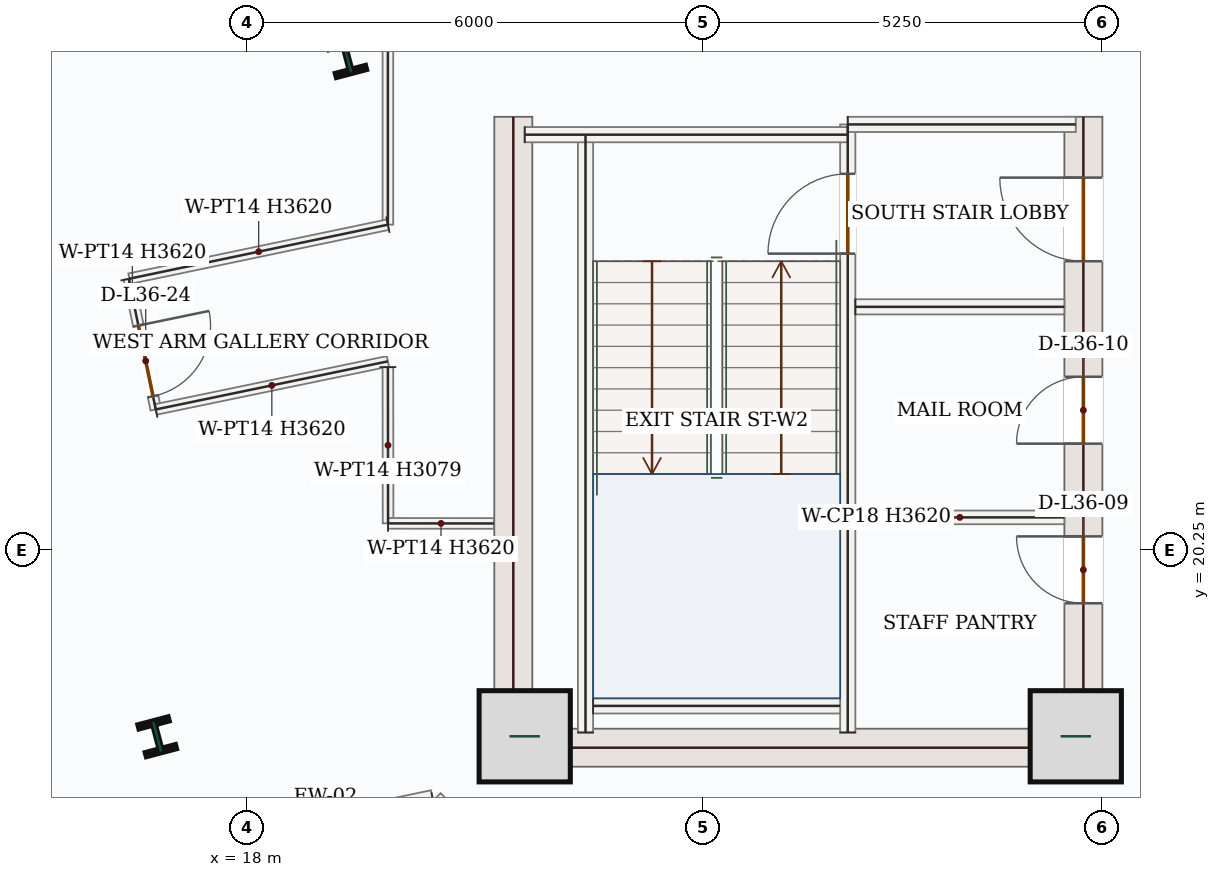
"""IFC4 building model, lengths in metres.
Left out: names, types, materials, properties, quantities, classifications, styles, units other than length and angle.
Written with IfcOpenShell. Run it as: python <this file> out.ifc"""

import sys

from ifc_helpers import new_model, si_unit, direction, frame, frame_2d, origin, origin_2d, place, context, subcontext, project, spatial, rectangle, i_section, extrude, source, transform, mapped, element, fill, save


model = new_model("IFC4")
c1 = context("Model", 3, precision=1e-05, world=origin(), true_north=direction((0.0, 1.0)))
c2 = subcontext(c1, "Body", "Model", "MODEL_VIEW")
j1 = project(units=[si_unit("LENGTHUNIT", "METRE"), si_unit("PLANEANGLEUNIT", "RADIAN")], contexts=[c1])
p1 = place(None, origin())
s1 = spatial("IfcSite", under=j1, at=p1, CompositionType="ELEMENT")
p2 = place(p1, origin())
s2 = spatial("IfcBuilding", under=s1, at=p2, CompositionType="ELEMENT")
p3 = place(p2, frame((0.0, 0.0, 159.0)))
s3 = spatial("IfcBuildingStorey", under=s2, at=p3, CompositionType="ELEMENT", Elevation=159.0)
m1 = source(origin(), c2, "Body", "SweptSolid", [
    extrude(rectangle(XDim=8.55, YDim=0.5, at=frame_2d((4.275, 0.0))), origin(), (0.0, 0.0, 1.0), 3.62),
])
p4 = place(p3, frame((21.5, 17.4, 0.0), z_axis=(0.0, 0.0, 1.0), x_axis=(0.0, 1.0, 0.0)))
e1 = element("IfcWall", 1, at=p4, inside=s3, PredefinedType="SHEAR", context=c2, shape_type="MappedRepresentation", body=[
    mapped(m1, transform((0.0, 0.0, 0.0), x_axis=(1.0, 0.0, 0.0), y_axis=(0.0, 1.0, 0.0), z_axis=(0.0, 0.0, 1.0), scale=1.0)),
])
p5 = place(p3, frame((29.0, 17.4, 0.0), z_axis=(0.0, 0.0, 1.0), x_axis=(0.0, 1.0, 0.0)))
e2 = element("IfcWall", 2, at=p5, inside=s3, PredefinedType="SHEAR", context=c2, shape_type="SweptSolid", body=[
    extrude(rectangle(XDim=8.55, YDim=0.5, at=frame_2d((4.275, 0.0))), origin(), (0.0, 0.0, 1.0), 3.62),
])
p6 = place(p5, frame((6.65, 0.0, 0.0)))
e3 = element("IfcOpeningElement", 3, at=p6, cuts=e2, PredefinedType="OPENING", context=c2, shape_type="SweptSolid", body=[
    extrude(rectangle(XDim=1.1, YDim=2.2, at=frame_2d((0.55, 1.1))), frame((0.0, 0.26, 0.0), z_axis=(0.0, -1.0, 0.0), x_axis=(1.0, 0.0, 0.0)), (0.0, 0.0, 1.0), 0.52),
])
p7 = place(p5, frame((2.15, 0.0, 0.0)))
e4 = element("IfcOpeningElement", 4, at=p7, cuts=e2, PredefinedType="OPENING", context=c2, shape_type="SweptSolid", body=[
    extrude(rectangle(XDim=0.88, YDim=2.1, at=frame_2d((0.44, 1.05))), frame((0.0, 0.26, 0.0), z_axis=(0.0, -1.0, 0.0), x_axis=(1.0, 0.0, 0.0)), (0.0, 0.0, 1.0), 0.52),
])
p8 = place(p5, frame((4.25, 0.0, 0.0)))
e5 = element("IfcOpeningElement", 5, at=p8, cuts=e2, PredefinedType="OPENING", context=c2, shape_type="SweptSolid", body=[
    extrude(rectangle(XDim=0.88, YDim=2.1, at=frame_2d((0.44, 1.05))), frame((0.0, 0.26, 0.0), z_axis=(0.0, -1.0, 0.0), x_axis=(1.0, 0.0, 0.0)), (0.0, 0.0, 1.0), 0.52),
])
m2 = source(origin(), c2, "Body", "SweptSolid", [
    extrude(rectangle(XDim=7.0, YDim=0.5, at=frame_2d((3.5, 0.0))), origin(), (0.0, 0.0, 1.0), 3.62),
])
p9 = place(p3, frame((21.75, 17.65, 0.0), z_axis=(0.0, 0.0, 1.0), x_axis=(1.0, 0.0, 0.0)))
e6 = element("IfcWall", 6, at=p9, inside=s3, PredefinedType="SHEAR", context=c2, shape_type="MappedRepresentation", body=[
    mapped(m2, transform((0.0, 0.0, 0.0), x_axis=(1.0, 0.0, 0.0), y_axis=(0.0, 1.0, 0.0), z_axis=(0.0, 0.0, 1.0), scale=1.0)),
])
m3 = source(origin(), c2, "Body", "SweptSolid", [
    extrude(rectangle(XDim=1.2, YDim=1.2, at=origin_2d()), origin(), (0.0, 0.0, 1.0), 3.9),
])
for number, where, z_axis, x_axis in (
    (7, (21.65, 17.8, 0.0), (0.0, 0.0, 1.0), (1.0, 0.0, 0.0)),
    (8, (28.9, 17.8, 0.0), (0.0, 0.0, 1.0), (1.0, 0.0, 0.0)),
):
    element("IfcColumn", number, at=place(p3, frame(where, z_axis=z_axis, x_axis=x_axis)), inside=s3, PredefinedType="COLUMN", context=c2, shape_type="MappedRepresentation", body=[
        mapped(m3, transform((0.0, 0.0, 0.0), x_axis=(1.0, 0.0, 0.0), y_axis=(0.0, 1.0, 0.0), z_axis=(0.0, 0.0, 1.0), scale=1.0)),
    ])
m4 = source(origin(), c2, "Body", "SweptSolid", [
    extrude(i_section(OverallWidth=0.412, OverallDepth=0.435, WebThickness=0.036, FlangeThickness=0.057, FilletRadius=0.018, at=origin_2d()), origin(), (0.0, 0.0, 1.0), 3.9),
])
for number, where, z_axis, x_axis in (
    (9, (19.316, 26.729, 0.0), (0.0, 0.0, 1.0), (0.967, 0.255, 0.0)),
    (10, (16.815, 17.794, 0.0), (0.0, 0.0, 1.0), (0.967, 0.255, 0.0)),
):
    element("IfcColumn", number, at=place(p3, frame(where, z_axis=z_axis, x_axis=x_axis)), inside=s3, PredefinedType="COLUMN", context=c2, shape_type="MappedRepresentation", body=[
        mapped(m4, transform((0.0, 0.0, 0.0), x_axis=(1.0, 0.0, 0.0), y_axis=(0.0, 1.0, 0.0), z_axis=(0.0, 0.0, 1.0), scale=1.0)),
    ])
m5 = source(origin(), c2, "Body", "SweptSolid", [
    extrude(rectangle(XDim=3.129, YDim=0.28, at=frame_2d((1.565, 0.0))), origin(), (0.0, 0.0, 1.0), 3.62),
])
p10 = place(p3, frame((22.658, 14.74, 0.0), z_axis=(0.0, 0.0, 1.0), x_axis=(-0.707067771627, 0.707145788594, 0.0)))
e11 = element("IfcWall", 11, at=p10, inside=s3, PredefinedType="SOLIDWALL", context=c2, shape_type="MappedRepresentation", body=[
    mapped(m5, transform((0.0, 0.0, 0.0), x_axis=(1.0, 0.0, 0.0), y_axis=(0.0, 1.0, 0.0), z_axis=(0.0, 0.0, 1.0), scale=1.0)),
])
p11 = place(p3, frame((20.445, 16.953, 0.0), z_axis=(0.0, 0.0, 1.0), x_axis=(-0.978938136474, -0.204157108515, 0.0)))
e12 = element("IfcWall", 12, at=p11, inside=s3, PredefinedType="SOLIDWALL", context=c2, shape_type="SweptSolid", body=[
    extrude(rectangle(XDim=7.882, YDim=0.28, at=frame_2d((3.941, 0.0))), origin(), (0.0, 0.0, 1.0), 3.62),
])
p12 = place(p11, frame((3.041, 0.0, 0.85)))
e13 = element("IfcOpeningElement", 13, at=p12, cuts=e12, PredefinedType="OPENING", context=c2, shape_type="SweptSolid", body=[
    extrude(rectangle(XDim=1.8, YDim=1.75, at=frame_2d((0.9, 0.875))), frame((0.0, 0.15, 0.0), z_axis=(0.0, -1.0, 0.0), x_axis=(1.0, 0.0, 0.0)), (0.0, 0.0, 1.0), 0.3),
])
m6 = source(origin(), c2, "Body", "SweptSolid", [
    extrude(rectangle(XDim=7.87, YDim=0.2, at=frame_2d((3.935, 0.0))), origin(), (0.0, 0.0, 1.0), 3.62),
])
p13 = place(p3, frame((22.45, 17.85, 0.0), z_axis=(0.0, 0.0, 1.0), x_axis=(0.0, 1.0, 0.0)))
e14 = element("IfcWall", 14, at=p13, inside=s3, PredefinedType="SOLIDWALL", context=c2, shape_type="MappedRepresentation", body=[
    mapped(m6, transform((0.0, 0.0, 0.0), x_axis=(1.0, 0.0, 0.0), y_axis=(0.0, 1.0, 0.0), z_axis=(0.0, 0.0, 1.0), scale=1.0)),
])
p14 = place(p3, frame((25.9, 17.85, 0.0), z_axis=(0.0, 0.0, 1.0), x_axis=(0.0, 1.0, 0.0)))
e15 = element("IfcWall", 15, at=p14, inside=s3, PredefinedType="SOLIDWALL", context=c2, shape_type="SweptSolid", body=[
    extrude(rectangle(XDim=8.0, YDim=0.2, at=frame_2d((4.0, 0.0))), origin(), (0.0, 0.0, 1.0), 3.62),
])
p15 = place(p14, frame((6.3, 0.0, 0.0)))
e16 = element("IfcOpeningElement", 16, at=p15, cuts=e15, PredefinedType="OPENING", context=c2, shape_type="SweptSolid", body=[
    extrude(rectangle(XDim=1.05, YDim=2.15, at=frame_2d((0.525, 1.075))), frame((0.0, 0.11, 0.0), z_axis=(0.0, -1.0, 0.0), x_axis=(1.0, 0.0, 0.0)), (0.0, 0.0, 1.0), 0.22),
])
m7 = source(origin(), c2, "Body", "SweptSolid", [
    extrude(rectangle(XDim=4.25, YDim=0.2, at=frame_2d((2.125, 0.0))), origin(), (0.0, 0.0, 1.0), 3.62),
])
p16 = place(p3, frame((21.65, 25.715, 0.0), z_axis=(0.0, 0.0, 1.0), x_axis=(1.0, 0.0, 0.0)))
e17 = element("IfcWall", 17, at=p16, inside=s3, PredefinedType="SOLIDWALL", context=c2, shape_type="MappedRepresentation", body=[
    mapped(m7, transform((0.0, 0.0, 0.0), x_axis=(1.0, 0.0, 0.0), y_axis=(0.0, 1.0, 0.0), z_axis=(0.0, 0.0, 1.0), scale=1.0)),
])
m8 = source(origin(), c2, "Body", "SweptSolid", [
    extrude(rectangle(XDim=3.0, YDim=0.2, at=frame_2d((1.5, 0.0))), origin(), (0.0, 0.0, 1.0), 3.62),
])
p17 = place(p3, frame((25.9, 25.85, 0.0), z_axis=(0.0, 0.0, 1.0), x_axis=(1.0, 0.0, 0.0)))
e18 = element("IfcWall", 18, at=p17, inside=s3, PredefinedType="SOLIDWALL", context=c2, shape_type="MappedRepresentation", body=[
    mapped(m8, transform((0.0, 0.0, 0.0), x_axis=(1.0, 0.0, 0.0), y_axis=(0.0, 1.0, 0.0), z_axis=(0.0, 0.0, 1.0), scale=1.0)),
])
m9 = source(origin(), c2, "Body", "SweptSolid", [
    extrude(rectangle(XDim=3.25, YDim=0.2, at=frame_2d((1.625, 0.0))), origin(), (0.0, 0.0, 1.0), 3.62),
])
p18 = place(p3, frame((22.55, 18.2, 0.0), z_axis=(0.0, 0.0, 1.0), x_axis=(1.0, 0.0, 0.0)))
e19 = element("IfcWall", 19, at=p18, inside=s3, PredefinedType="SOLIDWALL", context=c2, shape_type="MappedRepresentation", body=[
    mapped(m9, transform((0.0, 0.0, 0.0), x_axis=(1.0, 0.0, 0.0), y_axis=(0.0, 1.0, 0.0), z_axis=(0.0, 0.0, 1.0), scale=1.0)),
])
m10 = source(origin(), c2, "Body", "SweptSolid", [
    extrude(rectangle(XDim=2.75, YDim=0.2, at=frame_2d((1.375, 0.0))), origin(), (0.0, 0.0, 1.0), 3.62),
])
p19 = place(p3, frame((26.0, 23.45, 0.0), z_axis=(0.0, 0.0, 1.0), x_axis=(1.0, 0.0, 0.0)))
e20 = element("IfcWall", 20, at=p19, inside=s3, PredefinedType="SOLIDWALL", context=c2, shape_type="MappedRepresentation", body=[
    mapped(m10, transform((0.0, 0.0, 0.0), x_axis=(1.0, 0.0, 0.0), y_axis=(0.0, 1.0, 0.0), z_axis=(0.0, 0.0, 1.0), scale=1.0)),
])
m11 = source(origin(), c2, "Body", "SweptSolid", [
    extrude(rectangle(XDim=2.75, YDim=0.18, at=frame_2d((1.375, 0.0))), origin(), (0.0, 0.0, 1.0), 3.62),
])
p20 = place(p3, frame((26.0, 20.68, 0.0), z_axis=(0.0, 0.0, 1.0), x_axis=(1.0, 0.0, 0.0)))
e21 = element("IfcWall", 21, at=p20, inside=s3, PredefinedType="PARTITIONING", context=c2, shape_type="MappedRepresentation", body=[
    mapped(m11, transform((0.0, 0.0, 0.0), x_axis=(1.0, 0.0, 0.0), y_axis=(0.0, 1.0, 0.0), z_axis=(0.0, 0.0, 1.0), scale=1.0)),
])
p21 = place(p3, frame((16.44, 23.818, 0.0), z_axis=(0.0, 0.0, 1.0), x_axis=(0.202959786933, -0.979187073489, 0.0)))
e22 = element("IfcWall", 22, at=p21, inside=s3, PredefinedType="PARTITIONING", context=c2, shape_type="SweptSolid", body=[
    extrude(rectangle(XDim=1.755, YDim=0.14, at=frame_2d((0.877, 0.0))), origin(), (0.0, 0.0, 1.0), 3.62),
])
p22 = place(p21, frame((0.628, 0.0, 0.0)))
e23 = element("IfcOpeningElement", 23, at=p22, cuts=e22, PredefinedType="OPENING", context=c2, shape_type="SweptSolid", body=[
    extrude(rectangle(XDim=0.95, YDim=2.15, at=frame_2d((0.475, 1.075))), frame((0.0, 0.08, 0.0), z_axis=(0.0, -1.0, 0.0), x_axis=(1.0, 0.0, 0.0)), (0.0, 0.0, 1.0), 0.16),
])
m12 = source(origin(), c2, "Body", "SweptSolid", [
    extrude(rectangle(XDim=3.119, YDim=0.14, at=frame_2d((1.56, 0.0))), origin(), (0.0, 0.0, 1.0), 3.62),
])
p23 = place(p3, frame((16.796, 22.1, 0.0), z_axis=(0.0, 0.0, 1.0), x_axis=(0.979183767092, 0.202975738114, 0.0)))
e24 = element("IfcWall", 24, at=p23, inside=s3, PredefinedType="PARTITIONING", context=c2, shape_type="MappedRepresentation", body=[
    mapped(m12, transform((0.0, 0.0, 0.0), x_axis=(1.0, 0.0, 0.0), y_axis=(0.0, 1.0, 0.0), z_axis=(0.0, 0.0, 1.0), scale=1.0)),
])
m13 = source(origin(), c2, "Body", "SweptSolid", [
    extrude(rectangle(XDim=2.055, YDim=0.14, at=frame_2d((1.028, 0.0))), origin(), (0.0, 0.0, 1.0), 3.079),
])
p24 = place(p3, frame((19.85, 22.656, 0.0), z_axis=(0.0, 0.0, 1.0), x_axis=(0.001069136951, -0.999999428473, 0.0)))
e25 = element("IfcWall", 25, at=p24, inside=s3, PredefinedType="PARTITIONING", context=c2, shape_type="MappedRepresentation", body=[
    mapped(m13, transform((0.0, 0.0, 0.0), x_axis=(1.0, 0.0, 0.0), y_axis=(0.0, 1.0, 0.0), z_axis=(0.0, 0.0, 1.0), scale=1.0)),
])
m14 = source(origin(), c2, "Body", "SweptSolid", [
    extrude(rectangle(XDim=1.393, YDim=0.14, at=frame_2d((0.696, 0.0))), origin(), (0.0, 0.0, 1.0), 3.62),
])
p25 = place(p3, frame((19.852, 20.601, 0.0), z_axis=(0.0, 0.0, 1.0), x_axis=(0.999999615941, -0.000876423853, 0.0)))
e26 = element("IfcWall", 26, at=p25, inside=s3, PredefinedType="PARTITIONING", context=c2, shape_type="MappedRepresentation", body=[
    mapped(m14, transform((0.0, 0.0, 0.0), x_axis=(1.0, 0.0, 0.0), y_axis=(0.0, 1.0, 0.0), z_axis=(0.0, 0.0, 1.0), scale=1.0)),
])
m15 = source(origin(), c2, "Body", "SweptSolid", [
    extrude(rectangle(XDim=8.794, YDim=0.14, at=frame_2d((4.397, 0.0))), origin(), (0.0, 0.0, 1.0), 2.693),
])
p26 = place(p3, frame((19.85, 33.325, 0.0), z_axis=(0.0, 0.0, 1.0), x_axis=(-2.7762354e-05, -0.999999999615, 0.0)))
e27 = element("IfcWall", 27, at=p26, inside=s3, PredefinedType="PARTITIONING", context=c2, shape_type="MappedRepresentation", body=[
    mapped(m15, transform((0.0, 0.0, 0.0), x_axis=(1.0, 0.0, 0.0), y_axis=(0.0, 1.0, 0.0), z_axis=(0.0, 0.0, 1.0), scale=1.0)),
])
m16 = source(origin(), c2, "Body", "SweptSolid", [
    extrude(rectangle(XDim=3.474, YDim=0.14, at=frame_2d((1.737, 0.0))), origin(), (0.0, 0.0, 1.0), 3.62),
])
p27 = place(p3, frame((19.85, 24.531, 0.0), z_axis=(0.0, 0.0, 1.0), x_axis=(-0.978846306479, -0.204596941061, 0.0)))
e28 = element("IfcWall", 28, at=p27, inside=s3, PredefinedType="PARTITIONING", context=c2, shape_type="MappedRepresentation", body=[
    mapped(m16, transform((0.0, 0.0, 0.0), x_axis=(1.0, 0.0, 0.0), y_axis=(0.0, 1.0, 0.0), z_axis=(0.0, 0.0, 1.0), scale=1.0)),
])
m17 = source(origin(), c2, "Body", "SweptSolid", [
    extrude(rectangle(XDim=1.05, YDim=2.15, at=frame_2d((0.525, 1.075))), frame((0.0, 0.025, 0.0), z_axis=(0.0, -1.0, 0.0), x_axis=(1.0, 0.0, 0.0)), (0.0, 0.0, 1.0), 0.05),
])
p28 = place(p15, origin())
e29 = element("IfcDoor", 29, at=p28, inside=s3, OperationType="SINGLE_SWING_LEFT", PredefinedType="DOOR", context=c2, shape_type="MappedRepresentation", body=[
    mapped(m17, transform((0.0, 0.0, 0.0), x_axis=(1.0, 0.0, 0.0), y_axis=(0.0, 1.0, 0.0), z_axis=(0.0, 0.0, 1.0), scale=1.0)),
])
fill(e16, e29)
m18 = source(origin(), c2, "Body", "SweptSolid", [
    extrude(rectangle(XDim=1.1, YDim=2.2, at=frame_2d((0.55, 1.1))), frame((0.0, 0.025, 0.0), z_axis=(0.0, -1.0, 0.0), x_axis=(1.0, 0.0, 0.0)), (0.0, 0.0, 1.0), 0.05),
])
p29 = place(p6, origin())
e30 = element("IfcDoor", 30, at=p29, inside=s3, OperationType="SINGLE_SWING_RIGHT", PredefinedType="DOOR", context=c2, shape_type="MappedRepresentation", body=[
    mapped(m18, transform((0.0, 0.0, 0.0), x_axis=(1.0, 0.0, 0.0), y_axis=(0.0, 1.0, 0.0), z_axis=(0.0, 0.0, 1.0), scale=1.0)),
])
fill(e3, e30)
m19 = source(origin(), c2, "Body", "SweptSolid", [
    extrude(rectangle(XDim=0.88, YDim=2.1, at=frame_2d((0.44, 1.05))), frame((0.0, 0.025, 0.0), z_axis=(0.0, -1.0, 0.0), x_axis=(1.0, 0.0, 0.0)), (0.0, 0.0, 1.0), 0.05),
])
p30 = place(p7, origin())
e31 = element("IfcDoor", 31, at=p30, inside=s3, OperationType="SINGLE_SWING_RIGHT", PredefinedType="DOOR", context=c2, shape_type="MappedRepresentation", body=[
    mapped(m19, transform((0.0, 0.0, 0.0), x_axis=(1.0, 0.0, 0.0), y_axis=(0.0, 1.0, 0.0), z_axis=(0.0, 0.0, 1.0), scale=1.0)),
])
fill(e4, e31)
p31 = place(p8, origin())
e32 = element("IfcDoor", 32, at=p31, inside=s3, OperationType="SINGLE_SWING_LEFT", PredefinedType="DOOR", context=c2, shape_type="MappedRepresentation", body=[
    mapped(m19, transform((0.0, 0.0, 0.0), x_axis=(1.0, 0.0, 0.0), y_axis=(0.0, 1.0, 0.0), z_axis=(0.0, 0.0, 1.0), scale=1.0)),
])
fill(e5, e32)
m20 = source(origin(), c2, "Body", "SweptSolid", [
    extrude(rectangle(XDim=0.95, YDim=2.15, at=frame_2d((0.475, 1.075))), frame((0.0, 0.025, 0.0), z_axis=(0.0, -1.0, 0.0), x_axis=(1.0, 0.0, 0.0)), (0.0, 0.0, 1.0), 0.05),
])
p32 = place(p22, origin())
e33 = element("IfcDoor", 33, at=p32, inside=s3, OperationType="SINGLE_SWING_LEFT", PredefinedType="DOOR", context=c2, shape_type="MappedRepresentation", body=[
    mapped(m20, transform((0.0, 0.0, 0.0), x_axis=(1.0, 0.0, 0.0), y_axis=(0.0, 1.0, 0.0), z_axis=(0.0, 0.0, 1.0), scale=1.0)),
])
fill(e23, e33)
save(model, sys.argv[1])
